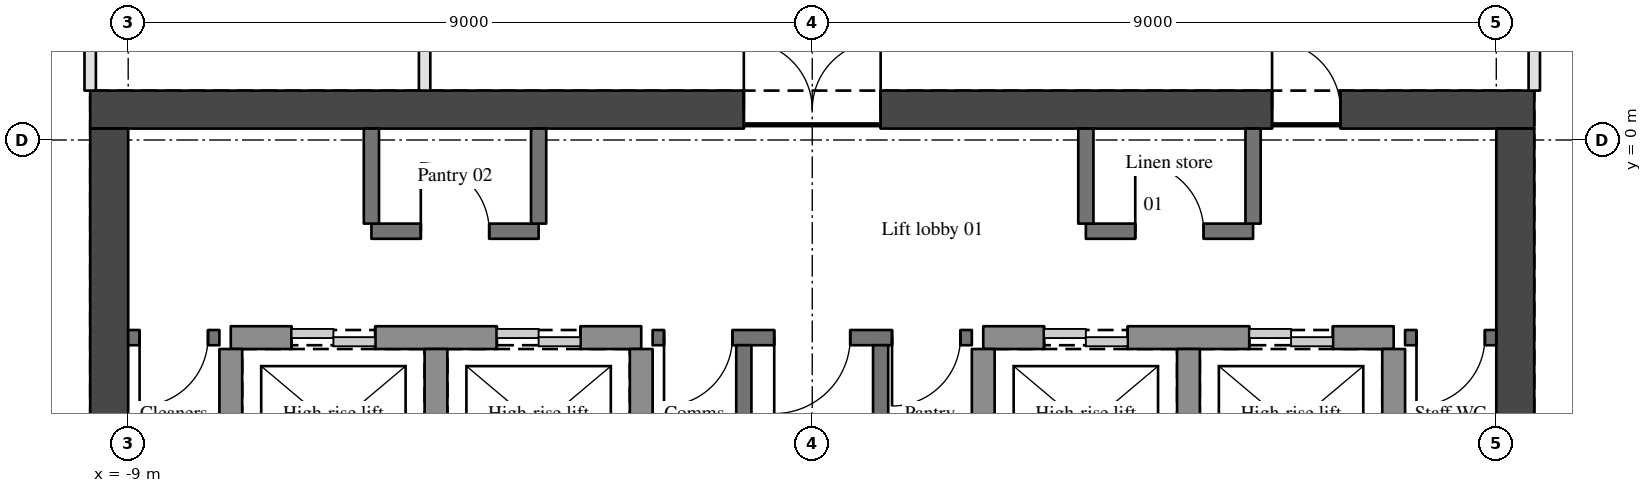
"""IFC4 building model, lengths in metres.
Left out: names, types, materials, properties, quantities, classifications, styles, units other than length and angle.
Written with IfcOpenShell. Run it as: python <this file> out.ifc"""

import sys

from ifc_helpers import new_model, si_unit, direction, frame, frame_2d, origin, place, context, subcontext, project, spatial, rectangle, extrude, element, fill, save


model = new_model("IFC4")
c1 = context("Model", 3, precision=1e-05, world=origin(), true_north=direction((0.0, 1.0)))
c2 = subcontext(c1, "Body", "Model", "MODEL_VIEW")
j1 = project(units=[si_unit("LENGTHUNIT", "METRE"), si_unit("PLANEANGLEUNIT", "RADIAN")], contexts=[c1])
p1 = place(None, origin())
s1 = spatial("IfcSite", under=j1, at=p1, CompositionType="ELEMENT")
p2 = place(p1, origin())
s2 = spatial("IfcBuilding", under=s1, at=p2, CompositionType="ELEMENT")
p3 = place(p2, frame((0.0, 0.0, 259.5)))
s3 = spatial("IfcBuildingStorey", under=s2, at=p3, CompositionType="ELEMENT", Elevation=259.5)
p4 = place(p3, frame((-9.5, 0.4, 0.0), z_axis=(0.0, 0.0, 1.0), x_axis=(1.0, 0.0, 0.0)))
e1 = element("IfcWall", 1, at=p4, inside=s3, PredefinedType="SHEAR", context=c2, shape_type="SweptSolid", body=[
    extrude(rectangle(XDim=19.0, YDim=0.5, at=frame_2d((9.5, 0.0))), origin(), (0.0, 0.0, 1.0), 3.15),
])
p5 = place(p4, frame((8.6, 0.0, 0.0)))
e2 = element("IfcOpeningElement", 2, at=p5, cuts=e1, PredefinedType="OPENING", context=c2, shape_type="SweptSolid", body=[
    extrude(rectangle(XDim=1.8, YDim=2.1, at=frame_2d((0.9, 1.05))), frame((0.0, 0.26, 0.0), z_axis=(0.0, -1.0, 0.0), x_axis=(1.0, 0.0, 0.0)), (0.0, 0.0, 1.0), 0.52),
])
p6 = place(p4, frame((15.55, 0.0, 0.0)))
e3 = element("IfcOpeningElement", 3, at=p6, cuts=e1, PredefinedType="OPENING", context=c2, shape_type="SweptSolid", body=[
    extrude(rectangle(XDim=0.9, YDim=2.1, at=frame_2d((0.45, 1.05))), frame((0.0, 0.26, 0.0), z_axis=(0.0, -1.0, 0.0), x_axis=(1.0, 0.0, 0.0)), (0.0, 0.0, 1.0), 0.52),
])
for number, where, z_axis, x_axis in (
    (4, (-9.25, -11.5, 0.0), (0.0, 0.0, 1.0), (0.0, 1.0, 0.0)),
    (5, (9.25, -11.5, 0.0), (0.0, 0.0, 1.0), (0.0, 1.0, 0.0)),
):
    element("IfcWall", number, at=place(p3, frame(where, z_axis=z_axis, x_axis=x_axis)), inside=s3, PredefinedType="SHEAR", context=c2, shape_type="SweptSolid", body=[
        extrude(rectangle(XDim=11.65, YDim=0.5, at=frame_2d((5.825, 0.0))), origin(), (0.0, 0.0, 1.0), 3.15),
    ])
p7 = place(p3, frame((-7.8, -2.6, 0.0), z_axis=(0.0, 0.0, 1.0), x_axis=(-1.0, 0.0, 0.0)))
e6 = element("IfcWall", 6, at=p7, inside=s3, PredefinedType="SOLIDWALL", context=c2, shape_type="SweptSolid", body=[
    extrude(rectangle(XDim=1.2, YDim=0.2, at=frame_2d((0.6, 0.0))), origin(), (0.0, 0.0, 1.0), 2.85),
])
p8 = place(p7, frame((0.15, 0.0, 0.0)))
e7 = element("IfcOpeningElement", 7, at=p8, cuts=e6, PredefinedType="OPENING", context=c2, shape_type="SweptSolid", body=[
    extrude(rectangle(XDim=0.9, YDim=2.1, at=frame_2d((0.45, 1.05))), frame((0.0, 0.11, 0.0), z_axis=(0.0, -1.0, 0.0), x_axis=(1.0, 0.0, 0.0)), (0.0, 0.0, 1.0), 0.22),
])
p9 = place(p3, frame((-7.65, -2.6, 0.0), z_axis=(0.0, 0.0, 1.0), x_axis=(1.0, 0.0, 0.0)))
e8 = element("IfcWall", 8, at=p9, inside=s3, PredefinedType="SHEAR", context=c2, shape_type="SweptSolid", body=[
    extrude(rectangle(XDim=5.4, YDim=0.3, at=frame_2d((2.7, 0.0))), origin(), (0.0, 0.0, 1.0), 3.15),
])
p10 = place(p9, frame((0.8, 0.0, 0.0)))
e9 = element("IfcOpeningElement", 9, at=p10, cuts=e8, PredefinedType="OPENING", context=c2, shape_type="SweptSolid", body=[
    extrude(rectangle(XDim=1.1, YDim=2.1, at=frame_2d((0.55, 1.05))), frame((0.0, 0.16, 0.0), z_axis=(0.0, -1.0, 0.0), x_axis=(1.0, 0.0, 0.0)), (0.0, 0.0, 1.0), 0.32),
])
p11 = place(p9, frame((3.5, 0.0, 0.0)))
e10 = element("IfcOpeningElement", 10, at=p11, cuts=e8, PredefinedType="OPENING", context=c2, shape_type="SweptSolid", body=[
    extrude(rectangle(XDim=1.1, YDim=2.1, at=frame_2d((0.55, 1.05))), frame((0.0, 0.16, 0.0), z_axis=(0.0, -1.0, 0.0), x_axis=(1.0, 0.0, 0.0)), (0.0, 0.0, 1.0), 0.32),
])
p12 = place(p3, frame((2.1, -2.6, 0.0), z_axis=(0.0, 0.0, 1.0), x_axis=(-1.0, 0.0, 0.0)))
e11 = element("IfcWall", 11, at=p12, inside=s3, PredefinedType="SOLIDWALL", context=c2, shape_type="SweptSolid", body=[
    extrude(rectangle(XDim=4.2, YDim=0.2, at=frame_2d((2.1, 0.0))), origin(), (0.0, 0.0, 1.0), 2.85),
])
p13 = place(p12, frame((1.6, 0.0, 0.0)))
e12 = element("IfcOpeningElement", 12, at=p13, cuts=e11, PredefinedType="OPENING", context=c2, shape_type="SweptSolid", body=[
    extrude(rectangle(XDim=1.0, YDim=2.1, at=frame_2d((0.5, 1.05))), frame((0.0, 0.11, 0.0), z_axis=(0.0, -1.0, 0.0), x_axis=(1.0, 0.0, 0.0)), (0.0, 0.0, 1.0), 0.22),
])
p14 = place(p12, frame((3.15, 0.0, 0.0)))
e13 = element("IfcOpeningElement", 13, at=p14, cuts=e11, PredefinedType="OPENING", context=c2, shape_type="SweptSolid", body=[
    extrude(rectangle(XDim=0.9, YDim=2.1, at=frame_2d((0.45, 1.05))), frame((0.0, 0.11, 0.0), z_axis=(0.0, -1.0, 0.0), x_axis=(1.0, 0.0, 0.0)), (0.0, 0.0, 1.0), 0.22),
])
p15 = place(p12, frame((0.15, 0.0, 0.0)))
e14 = element("IfcOpeningElement", 14, at=p15, cuts=e11, PredefinedType="OPENING", context=c2, shape_type="SweptSolid", body=[
    extrude(rectangle(XDim=0.9, YDim=2.1, at=frame_2d((0.45, 1.05))), frame((0.0, 0.11, 0.0), z_axis=(0.0, -1.0, 0.0), x_axis=(1.0, 0.0, 0.0)), (0.0, 0.0, 1.0), 0.22),
])
p16 = place(p3, frame((2.25, -2.6, 0.0), z_axis=(0.0, 0.0, 1.0), x_axis=(1.0, 0.0, 0.0)))
e15 = element("IfcWall", 15, at=p16, inside=s3, PredefinedType="SHEAR", context=c2, shape_type="SweptSolid", body=[
    extrude(rectangle(XDim=5.4, YDim=0.3, at=frame_2d((2.7, 0.0))), origin(), (0.0, 0.0, 1.0), 3.15),
])
p17 = place(p16, frame((0.8, 0.0, 0.0)))
e16 = element("IfcOpeningElement", 16, at=p17, cuts=e15, PredefinedType="OPENING", context=c2, shape_type="SweptSolid", body=[
    extrude(rectangle(XDim=1.1, YDim=2.1, at=frame_2d((0.55, 1.05))), frame((0.0, 0.16, 0.0), z_axis=(0.0, -1.0, 0.0), x_axis=(1.0, 0.0, 0.0)), (0.0, 0.0, 1.0), 0.32),
])
p18 = place(p16, frame((3.5, 0.0, 0.0)))
e17 = element("IfcOpeningElement", 17, at=p18, cuts=e15, PredefinedType="OPENING", context=c2, shape_type="SweptSolid", body=[
    extrude(rectangle(XDim=1.1, YDim=2.1, at=frame_2d((0.55, 1.05))), frame((0.0, 0.16, 0.0), z_axis=(0.0, -1.0, 0.0), x_axis=(1.0, 0.0, 0.0)), (0.0, 0.0, 1.0), 0.32),
])
p19 = place(p3, frame((9.0, -2.6, 0.0), z_axis=(0.0, 0.0, 1.0), x_axis=(-1.0, 0.0, 0.0)))
e18 = element("IfcWall", 18, at=p19, inside=s3, PredefinedType="SOLIDWALL", context=c2, shape_type="SweptSolid", body=[
    extrude(rectangle(XDim=1.2, YDim=0.2, at=frame_2d((0.6, 0.0))), origin(), (0.0, 0.0, 1.0), 2.85),
])
p20 = place(p19, frame((0.15, 0.0, 0.0)))
e19 = element("IfcOpeningElement", 19, at=p20, cuts=e18, PredefinedType="OPENING", context=c2, shape_type="SweptSolid", body=[
    extrude(rectangle(XDim=0.9, YDim=2.1, at=frame_2d((0.45, 1.05))), frame((0.0, 0.11, 0.0), z_axis=(0.0, -1.0, 0.0), x_axis=(1.0, 0.0, 0.0)), (0.0, 0.0, 1.0), 0.22),
])
p21 = place(p3, frame((-5.8, -1.2, 0.0), z_axis=(0.0, 0.0, 1.0), x_axis=(1.0, 0.0, 0.0)))
e20 = element("IfcWall", 20, at=p21, inside=s3, PredefinedType="SOLIDWALL", context=c2, shape_type="SweptSolid", body=[
    extrude(rectangle(XDim=2.2, YDim=0.2, at=frame_2d((1.1, 0.0))), origin(), (0.0, 0.0, 1.0), 2.85),
])
p22 = place(p21, frame((0.65, 0.0, 0.0)))
e21 = element("IfcOpeningElement", 21, at=p22, cuts=e20, PredefinedType="OPENING", context=c2, shape_type="SweptSolid", body=[
    extrude(rectangle(XDim=0.9, YDim=2.1, at=frame_2d((0.45, 1.05))), frame((0.0, 0.11, 0.0), z_axis=(0.0, -1.0, 0.0), x_axis=(1.0, 0.0, 0.0)), (0.0, 0.0, 1.0), 0.22),
])
p23 = place(p3, frame((3.6, -1.2, 0.0), z_axis=(0.0, 0.0, 1.0), x_axis=(1.0, 0.0, 0.0)))
e22 = element("IfcWall", 22, at=p23, inside=s3, PredefinedType="SOLIDWALL", context=c2, shape_type="SweptSolid", body=[
    extrude(rectangle(XDim=2.2, YDim=0.2, at=frame_2d((1.1, 0.0))), origin(), (0.0, 0.0, 1.0), 2.85),
])
p24 = place(p23, frame((0.65, 0.0, 0.0)))
e23 = element("IfcOpeningElement", 23, at=p24, cuts=e22, PredefinedType="OPENING", context=c2, shape_type="SweptSolid", body=[
    extrude(rectangle(XDim=0.9, YDim=2.1, at=frame_2d((0.45, 1.05))), frame((0.0, 0.11, 0.0), z_axis=(0.0, -1.0, 0.0), x_axis=(1.0, 0.0, 0.0)), (0.0, 0.0, 1.0), 0.22),
])
p25 = place(p3, frame((-9.5, 0.65, 0.0), z_axis=(0.0, 0.0, 1.0), x_axis=(0.0, 1.0, 0.0)))
e24 = element("IfcWall", 24, at=p25, inside=s3, PredefinedType="PARTITIONING", context=c2, shape_type="SweptSolid", body=[
    extrude(rectangle(XDim=11.86, YDim=0.15, at=frame_2d((5.93, 0.0))), origin(), (0.0, 0.0, 1.0), 2.21),
])
p26 = place(p25, frame((2.75, 0.0, 0.0)))
e25 = element("IfcOpeningElement", 25, at=p26, cuts=e24, PredefinedType="OPENING", context=c2, shape_type="SweptSolid", body=[
    extrude(rectangle(XDim=0.9, YDim=2.1, at=frame_2d((0.45, 1.05))), frame((0.0, 0.085, 0.0), z_axis=(0.0, -1.0, 0.0), x_axis=(1.0, 0.0, 0.0)), (0.0, 0.0, 1.0), 0.17),
])
p27 = place(p3, frame((-7.65, -4.8, 0.0), z_axis=(0.0, 0.0, 1.0), x_axis=(0.0, 1.0, 0.0)))
e26 = element("IfcWall", 26, at=p27, inside=s3, PredefinedType="SHEAR", context=c2, shape_type="SweptSolid", body=[
    extrude(rectangle(XDim=2.05, YDim=0.3, at=frame_2d((1.025, 0.0))), origin(), (0.0, 0.0, 1.0), 3.15),
])
p28 = place(p3, frame((-5.8, -1.1, 0.0), z_axis=(0.0, 0.0, 1.0), x_axis=(0.0, 1.0, 0.0)))
e27 = element("IfcWall", 27, at=p28, inside=s3, PredefinedType="SOLIDWALL", context=c2, shape_type="SweptSolid", body=[
    extrude(rectangle(XDim=1.25, YDim=0.2, at=frame_2d((0.625, 0.0))), origin(), (0.0, 0.0, 1.0), 2.85),
])
p29 = place(p3, frame((-5.1, 0.65, 0.0), z_axis=(0.0, 0.0, 1.0), x_axis=(0.0, 1.0, 0.0)))
e28 = element("IfcWall", 28, at=p29, inside=s3, PredefinedType="PARTITIONING", context=c2, shape_type="SweptSolid", body=[
    extrude(rectangle(XDim=2.525, YDim=0.15, at=frame_2d((1.263, 0.0))), origin(), (0.0, 0.0, 1.0), 2.21),
])
p30 = place(p29, frame((0.85, 0.0, 0.0)))
e29 = element("IfcOpeningElement", 29, at=p30, cuts=e28, PredefinedType="OPENING", context=c2, shape_type="SweptSolid", body=[
    extrude(rectangle(XDim=0.9, YDim=2.1, at=frame_2d((0.45, 1.05))), frame((0.0, 0.085, 0.0), z_axis=(0.0, -1.0, 0.0), x_axis=(1.0, 0.0, 0.0)), (0.0, 0.0, 1.0), 0.17),
])
p31 = place(p3, frame((-4.95, -4.8, 0.0), z_axis=(0.0, 0.0, 1.0), x_axis=(0.0, 1.0, 0.0)))
e30 = element("IfcWall", 30, at=p31, inside=s3, PredefinedType="SHEAR", context=c2, shape_type="SweptSolid", body=[
    extrude(rectangle(XDim=2.05, YDim=0.3, at=frame_2d((1.025, 0.0))), origin(), (0.0, 0.0, 1.0), 3.15),
])
p32 = place(p3, frame((-3.6, -1.1, 0.0), z_axis=(0.0, 0.0, 1.0), x_axis=(0.0, 1.0, 0.0)))
e31 = element("IfcWall", 31, at=p32, inside=s3, PredefinedType="SOLIDWALL", context=c2, shape_type="SweptSolid", body=[
    extrude(rectangle(XDim=1.25, YDim=0.2, at=frame_2d((0.625, 0.0))), origin(), (0.0, 0.0, 1.0), 2.85),
])
p33 = place(p3, frame((-2.25, -4.8, 0.0), z_axis=(0.0, 0.0, 1.0), x_axis=(0.0, 1.0, 0.0)))
e32 = element("IfcWall", 32, at=p33, inside=s3, PredefinedType="SHEAR", context=c2, shape_type="SweptSolid", body=[
    extrude(rectangle(XDim=2.05, YDim=0.3, at=frame_2d((1.025, 0.0))), origin(), (0.0, 0.0, 1.0), 3.15),
])
for number, where, z_axis, x_axis in (
    (33, (-0.9, -4.85, 0.0), (0.0, 0.0, 1.0), (0.0, 1.0, 0.0)),
    (34, (0.9, -4.85, 0.0), (0.0, 0.0, 1.0), (0.0, 1.0, 0.0)),
):
    element("IfcWall", number, at=place(p3, frame(where, z_axis=z_axis, x_axis=x_axis)), inside=s3, PredefinedType="SOLIDWALL", context=c2, shape_type="SweptSolid", body=[
        extrude(rectangle(XDim=2.15, YDim=0.2, at=frame_2d((1.075, 0.0))), origin(), (0.0, 0.0, 1.0), 2.85),
    ])
p34 = place(p3, frame((2.25, -4.8, 0.0), z_axis=(0.0, 0.0, 1.0), x_axis=(0.0, 1.0, 0.0)))
e35 = element("IfcWall", 35, at=p34, inside=s3, PredefinedType="SHEAR", context=c2, shape_type="SweptSolid", body=[
    extrude(rectangle(XDim=2.05, YDim=0.3, at=frame_2d((1.025, 0.0))), origin(), (0.0, 0.0, 1.0), 3.15),
])
p35 = place(p3, frame((3.6, -1.1, 0.0), z_axis=(0.0, 0.0, 1.0), x_axis=(0.0, 1.0, 0.0)))
e36 = element("IfcWall", 36, at=p35, inside=s3, PredefinedType="SOLIDWALL", context=c2, shape_type="SweptSolid", body=[
    extrude(rectangle(XDim=1.25, YDim=0.2, at=frame_2d((0.625, 0.0))), origin(), (0.0, 0.0, 1.0), 2.85),
])
p36 = place(p3, frame((4.95, -4.8, 0.0), z_axis=(0.0, 0.0, 1.0), x_axis=(0.0, 1.0, 0.0)))
e37 = element("IfcWall", 37, at=p36, inside=s3, PredefinedType="SHEAR", context=c2, shape_type="SweptSolid", body=[
    extrude(rectangle(XDim=2.05, YDim=0.3, at=frame_2d((1.025, 0.0))), origin(), (0.0, 0.0, 1.0), 3.15),
])
p37 = place(p3, frame((5.8, -1.1, 0.0), z_axis=(0.0, 0.0, 1.0), x_axis=(0.0, 1.0, 0.0)))
e38 = element("IfcWall", 38, at=p37, inside=s3, PredefinedType="SOLIDWALL", context=c2, shape_type="SweptSolid", body=[
    extrude(rectangle(XDim=1.25, YDim=0.2, at=frame_2d((0.625, 0.0))), origin(), (0.0, 0.0, 1.0), 2.85),
])
p38 = place(p3, frame((7.65, -4.8, 0.0), z_axis=(0.0, 0.0, 1.0), x_axis=(0.0, 1.0, 0.0)))
e39 = element("IfcWall", 39, at=p38, inside=s3, PredefinedType="SHEAR", context=c2, shape_type="SweptSolid", body=[
    extrude(rectangle(XDim=2.05, YDim=0.3, at=frame_2d((1.025, 0.0))), origin(), (0.0, 0.0, 1.0), 3.15),
])
p39 = place(p3, frame((9.5, 8.2, 0.0), z_axis=(0.0, 0.0, 1.0), x_axis=(0.0, -1.0, 0.0)))
e40 = element("IfcWall", 40, at=p39, inside=s3, PredefinedType="PARTITIONING", context=c2, shape_type="SweptSolid", body=[
    extrude(rectangle(XDim=7.55, YDim=0.15, at=frame_2d((3.775, 0.0))), origin(), (0.0, 0.0, 1.0), 2.21),
])
p40 = place(p39, frame((4.675, 0.0, 0.0)))
e41 = element("IfcOpeningElement", 41, at=p40, cuts=e40, PredefinedType="OPENING", context=c2, shape_type="SweptSolid", body=[
    extrude(rectangle(XDim=1.0, YDim=2.1, at=frame_2d((0.5, 1.05))), frame((0.0, 0.085, 0.0), z_axis=(0.0, -1.0, 0.0), x_axis=(1.0, 0.0, 0.0)), (0.0, 0.0, 1.0), 0.17),
])
p41 = place(p5, origin())
e42 = element("IfcDoor", 42, at=p41, inside=s3, OperationType="DOUBLE_DOOR_SINGLE_SWING", PredefinedType="DOOR", context=c2, shape_type="SweptSolid", body=[
    extrude(rectangle(XDim=1.8, YDim=2.1, at=frame_2d((0.9, 1.05))), frame((0.0, 0.025, 0.0), z_axis=(0.0, -1.0, 0.0), x_axis=(1.0, 0.0, 0.0)), (0.0, 0.0, 1.0), 0.05),
])
fill(e2, e42)
p42 = place(p13, origin())
e43 = element("IfcDoor", 43, at=p42, inside=s3, OperationType="SINGLE_SWING_RIGHT", PredefinedType="DOOR", context=c2, shape_type="SweptSolid", body=[
    extrude(rectangle(XDim=1.0, YDim=2.1, at=frame_2d((0.5, 1.05))), frame((0.0, 0.025, 0.0), z_axis=(0.0, -1.0, 0.0), x_axis=(1.0, 0.0, 0.0)), (0.0, 0.0, 1.0), 0.05),
])
fill(e12, e43)
p43 = place(p14, origin())
e44 = element("IfcDoor", 44, at=p43, inside=s3, OperationType="SINGLE_SWING_RIGHT", PredefinedType="DOOR", context=c2, shape_type="SweptSolid", body=[
    extrude(rectangle(XDim=0.9, YDim=2.1, at=frame_2d((0.45, 1.05))), frame((0.0, 0.025, 0.0), z_axis=(0.0, -1.0, 0.0), x_axis=(1.0, 0.0, 0.0)), (0.0, 0.0, 1.0), 0.05),
])
fill(e13, e44)
p44 = place(p15, origin())
e45 = element("IfcDoor", 45, at=p44, inside=s3, OperationType="SINGLE_SWING_RIGHT", PredefinedType="DOOR", context=c2, shape_type="SweptSolid", body=[
    extrude(rectangle(XDim=0.9, YDim=2.1, at=frame_2d((0.45, 1.05))), frame((0.0, 0.025, 0.0), z_axis=(0.0, -1.0, 0.0), x_axis=(1.0, 0.0, 0.0)), (0.0, 0.0, 1.0), 0.05),
])
fill(e14, e45)
p45 = place(p20, origin())
e46 = element("IfcDoor", 46, at=p45, inside=s3, OperationType="SINGLE_SWING_RIGHT", PredefinedType="DOOR", context=c2, shape_type="SweptSolid", body=[
    extrude(rectangle(XDim=0.9, YDim=2.1, at=frame_2d((0.45, 1.05))), frame((0.0, 0.025, 0.0), z_axis=(0.0, -1.0, 0.0), x_axis=(1.0, 0.0, 0.0)), (0.0, 0.0, 1.0), 0.05),
])
fill(e19, e46)
p46 = place(p8, origin())
e47 = element("IfcDoor", 47, at=p46, inside=s3, OperationType="SINGLE_SWING_RIGHT", PredefinedType="DOOR", context=c2, shape_type="SweptSolid", body=[
    extrude(rectangle(XDim=0.9, YDim=2.1, at=frame_2d((0.45, 1.05))), frame((0.0, 0.025, 0.0), z_axis=(0.0, -1.0, 0.0), x_axis=(1.0, 0.0, 0.0)), (0.0, 0.0, 1.0), 0.05),
])
fill(e7, e47)
p47 = place(p6, origin())
e48 = element("IfcDoor", 48, at=p47, inside=s3, OperationType="SINGLE_SWING_LEFT", PredefinedType="DOOR", context=c2, shape_type="SweptSolid", body=[
    extrude(rectangle(XDim=0.9, YDim=2.1, at=frame_2d((0.45, 1.05))), frame((0.0, 0.025, 0.0), z_axis=(0.0, -1.0, 0.0), x_axis=(1.0, 0.0, 0.0)), (0.0, 0.0, 1.0), 0.05),
])
fill(e3, e48)
p48 = place(p22, origin())
e49 = element("IfcDoor", 49, at=p48, inside=s3, OperationType="SINGLE_SWING_LEFT", PredefinedType="DOOR", context=c2, shape_type="SweptSolid", body=[
    extrude(rectangle(XDim=0.9, YDim=2.1, at=frame_2d((0.45, 1.05))), frame((0.0, 0.025, 0.0), z_axis=(0.0, -1.0, 0.0), x_axis=(1.0, 0.0, 0.0)), (0.0, 0.0, 1.0), 0.05),
])
fill(e21, e49)
p49 = place(p24, origin())
e50 = element("IfcDoor", 50, at=p49, inside=s3, OperationType="SINGLE_SWING_LEFT", PredefinedType="DOOR", context=c2, shape_type="SweptSolid", body=[
    extrude(rectangle(XDim=0.9, YDim=2.1, at=frame_2d((0.45, 1.05))), frame((0.0, 0.025, 0.0), z_axis=(0.0, -1.0, 0.0), x_axis=(1.0, 0.0, 0.0)), (0.0, 0.0, 1.0), 0.05),
])
fill(e23, e50)
p50 = place(p10, origin())
e51 = element("IfcDoor", 51, at=p50, inside=s3, OperationType="DOUBLE_DOOR_SLIDING", PredefinedType="DOOR", context=c2, shape_type="SweptSolid", body=[
    extrude(rectangle(XDim=1.1, YDim=2.1, at=frame_2d((0.55, 1.05))), frame((0.0, 0.025, 0.0), z_axis=(0.0, -1.0, 0.0), x_axis=(1.0, 0.0, 0.0)), (0.0, 0.0, 1.0), 0.05),
])
fill(e9, e51)
p51 = place(p11, origin())
e52 = element("IfcDoor", 52, at=p51, inside=s3, OperationType="DOUBLE_DOOR_SLIDING", PredefinedType="DOOR", context=c2, shape_type="SweptSolid", body=[
    extrude(rectangle(XDim=1.1, YDim=2.1, at=frame_2d((0.55, 1.05))), frame((0.0, 0.025, 0.0), z_axis=(0.0, -1.0, 0.0), x_axis=(1.0, 0.0, 0.0)), (0.0, 0.0, 1.0), 0.05),
])
fill(e10, e52)
p52 = place(p17, origin())
e53 = element("IfcDoor", 53, at=p52, inside=s3, OperationType="DOUBLE_DOOR_SLIDING", PredefinedType="DOOR", context=c2, shape_type="SweptSolid", body=[
    extrude(rectangle(XDim=1.1, YDim=2.1, at=frame_2d((0.55, 1.05))), frame((0.0, 0.025, 0.0), z_axis=(0.0, -1.0, 0.0), x_axis=(1.0, 0.0, 0.0)), (0.0, 0.0, 1.0), 0.05),
])
fill(e16, e53)
p53 = place(p18, origin())
e54 = element("IfcDoor", 54, at=p53, inside=s3, OperationType="DOUBLE_DOOR_SLIDING", PredefinedType="DOOR", context=c2, shape_type="SweptSolid", body=[
    extrude(rectangle(XDim=1.1, YDim=2.1, at=frame_2d((0.55, 1.05))), frame((0.0, 0.025, 0.0), z_axis=(0.0, -1.0, 0.0), x_axis=(1.0, 0.0, 0.0)), (0.0, 0.0, 1.0), 0.05),
])
fill(e17, e54)
save(model, sys.argv[1])
